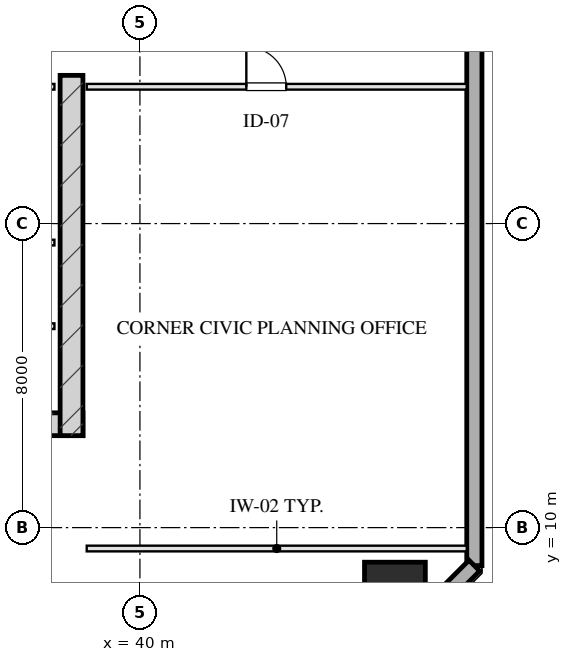
"""IFC4 building model, lengths in metres.
Left out: names, types, materials, properties, quantities, classifications, styles, units other than length and angle.
Written with IfcOpenShell. Run it as: python <this file> out.ifc"""

import sys

from ifc_helpers import new_model, si_unit, direction, frame, frame_2d, origin, origin_2d, place, context, subcontext, project, spatial, rectangle, hollow_rectangle, extrude, element, fill, save


model = new_model("IFC4")
c1 = context("Model", 3, precision=1e-05, world=origin(), true_north=direction((0.0, 1.0)))
c2 = subcontext(c1, "Body", "Model", "MODEL_VIEW")
j1 = project(units=[si_unit("LENGTHUNIT", "METRE"), si_unit("PLANEANGLEUNIT", "RADIAN")], contexts=[c1])
p1 = place(None, origin())
s1 = spatial("IfcSite", under=j1, at=p1, CompositionType="ELEMENT")
p2 = place(p1, origin())
s2 = spatial("IfcBuilding", under=s1, at=p2, CompositionType="ELEMENT")
p3 = place(p2, frame((0.0, 0.0, 149.5)))
s3 = spatial("IfcBuildingStorey", under=s2, at=p3, CompositionType="ELEMENT", Elevation=149.5)
p4 = place(p3, frame((21.5, 12.72, 0.0), z_axis=(0.0, 0.0, 1.0), x_axis=(1.0, 0.0, 0.0)))
e1 = element("IfcWall", 1, at=p4, inside=s3, PredefinedType="SHEAR", context=c2, shape_type="SweptSolid", body=[
    extrude(rectangle(XDim=17.0, YDim=0.6, at=frame_2d((8.5, 0.0))), origin(), (0.0, 0.0, 1.0), 3.45),
])
p5 = place(p3, frame((38.2, 21.9, 0.0), z_axis=(0.0, 0.0, 1.0), x_axis=(0.0, -1.0, 0.0)))
e2 = element("IfcWall", 2, at=p5, inside=s3, PredefinedType="SHEAR", context=c2, shape_type="SweptSolid", body=[
    extrude(rectangle(XDim=9.48, YDim=0.6, at=frame_2d((4.74, 0.0))), origin(), (0.0, 0.0, 1.0), 3.45),
])
p6 = place(p3, frame((46.71, 8.29, 0.0), z_axis=(0.0, 0.0, 1.0), x_axis=(1.0, 0.0, 0.0)))
e3 = element("IfcColumn", 3, at=p6, inside=s3, PredefinedType="COLUMN", context=c2, shape_type="SweptSolid", body=[
    extrude(hollow_rectangle(XDim=1.6, YDim=1.6, WallThickness=0.055, at=origin_2d()), origin(), (0.0, 0.0, 1.0), 3.451),
])
p7 = place(p3, frame((48.8, 59.0, 0.0), z_axis=(0.0, 0.0, 1.0), x_axis=(0.0, -1.0, 0.0)))
e4 = element("IfcWall", 4, at=p7, inside=s3, PredefinedType="SOLIDWALL", context=c2, shape_type="SweptSolid", body=[
    extrude(rectangle(XDim=50.0, YDim=0.4, at=frame_2d((25.0, 0.0))), origin(), (0.0, 0.0, 1.0), 2.61),
])
p8 = place(p7, frame((30.275, 0.0, 0.75)))
e5 = element("IfcOpeningElement", 5, at=p8, cuts=e4, PredefinedType="OPENING", context=c2, shape_type="SweptSolid", body=[
    extrude(rectangle(XDim=2.25, YDim=1.46, at=frame_2d((1.125, 0.73))), frame((0.0, 0.21, 0.0), z_axis=(0.0, -1.0, 0.0), x_axis=(1.0, 0.0, 0.0)), (0.0, 0.0, 1.0), 0.42),
])
p9 = place(p7, frame((17.475, 0.0, 0.75)))
e6 = element("IfcOpeningElement", 6, at=p9, cuts=e4, PredefinedType="OPENING", context=c2, shape_type="SweptSolid", body=[
    extrude(rectangle(XDim=2.25, YDim=1.46, at=frame_2d((1.125, 0.73))), frame((0.0, 0.21, 0.0), z_axis=(0.0, -1.0, 0.0), x_axis=(1.0, 0.0, 0.0)), (0.0, 0.0, 1.0), 0.42),
])
p10 = place(p3, frame((48.8, 9.0, 0.0), z_axis=(0.0, 0.0, 1.0), x_axis=(-0.707106781187, -0.707106781187, 0.0)))
e7 = element("IfcWall", 7, at=p10, inside=s3, PredefinedType="SOLIDWALL", context=c2, shape_type="SweptSolid", body=[
    extrude(rectangle(XDim=3.96, YDim=0.4, at=frame_2d((1.98, 0.0))), origin(), (0.0, 0.0, 1.0), 2.61),
])
p11 = place(p3, frame((33.95, 21.6, 0.0), z_axis=(0.0, 0.0, 1.0), x_axis=(1.0, 0.0, 0.0)))
e8 = element("IfcWall", 8, at=p11, inside=s3, PredefinedType="PARTITIONING", context=c2, shape_type="SweptSolid", body=[
    extrude(rectangle(XDim=3.8, YDim=0.15, at=frame_2d((1.9, 0.0))), origin(), (0.0, 0.0, 1.0), 3.175),
])
p12 = place(p11, frame((0.22, 0.0, 0.0)))
e9 = element("IfcOpeningElement", 9, at=p12, cuts=e8, PredefinedType="OPENING", context=c2, shape_type="SweptSolid", body=[
    extrude(rectangle(XDim=0.95, YDim=2.05, at=frame_2d((0.475, 1.025))), frame((0.0, 0.085, 0.0), z_axis=(0.0, -1.0, 0.0), x_axis=(1.0, 0.0, 0.0)), (0.0, 0.0, 1.0), 0.17),
])
for number, where, z_axis, x_axis in (
    (10, (35.45, 17.5, 0.0), (0.0, 0.0, 1.0), (1.0, 0.0, 0.0)),
    (11, (35.45, 15.3, 0.0), (0.0, 0.0, 1.0), (1.0, 0.0, 0.0)),
):
    element("IfcWall", number, at=place(p3, frame(where, z_axis=z_axis, x_axis=x_axis)), inside=s3, PredefinedType="PARTITIONING", context=c2, shape_type="SweptSolid", body=[
        extrude(rectangle(XDim=2.3, YDim=0.15, at=frame_2d((1.15, 0.0))), origin(), (0.0, 0.0, 1.0), 3.175),
    ])
p13 = place(p3, frame((38.6, 9.45, 0.0), z_axis=(0.0, 0.0, 1.0), x_axis=(1.0, 0.0, 0.0)))
e12 = element("IfcWall", 12, at=p13, inside=s3, PredefinedType="PARTITIONING", context=c2, shape_type="SweptSolid", body=[
    extrude(rectangle(XDim=10.0, YDim=0.15, at=frame_2d((5.0, 0.0))), origin(), (0.0, 0.0, 1.0), 3.175),
])
p14 = place(p3, frame((38.6, 21.6, 0.0), z_axis=(0.0, 0.0, 1.0), x_axis=(1.0, 0.0, 0.0)))
e13 = element("IfcWall", 13, at=p14, inside=s3, PredefinedType="PARTITIONING", context=c2, shape_type="SweptSolid", body=[
    extrude(rectangle(XDim=10.0, YDim=0.15, at=frame_2d((5.0, 0.0))), origin(), (0.0, 0.0, 1.0), 3.175),
])
p15 = place(p14, frame((4.2, 0.0, 0.0)))
e14 = element("IfcOpeningElement", 14, at=p15, cuts=e13, PredefinedType="OPENING", context=c2, shape_type="SweptSolid", body=[
    extrude(rectangle(XDim=1.05, YDim=2.05, at=frame_2d((0.525, 1.025))), frame((0.0, 0.085, 0.0), z_axis=(0.0, -1.0, 0.0), x_axis=(1.0, 0.0, 0.0)), (0.0, 0.0, 1.0), 0.17),
])
p16 = place(p15, origin())
e15 = element("IfcDoor", 15, at=p16, inside=s3, OperationType="SINGLE_SWING_LEFT", PredefinedType="DOOR", context=c2, shape_type="SweptSolid", body=[
    extrude(rectangle(XDim=1.05, YDim=2.05, at=frame_2d((0.525, 1.025))), frame((0.0, 0.025, 0.0), z_axis=(0.0, -1.0, 0.0), x_axis=(1.0, 0.0, 0.0)), (0.0, 0.0, 1.0), 0.05),
])
fill(e14, e15)
save(model, sys.argv[1])
